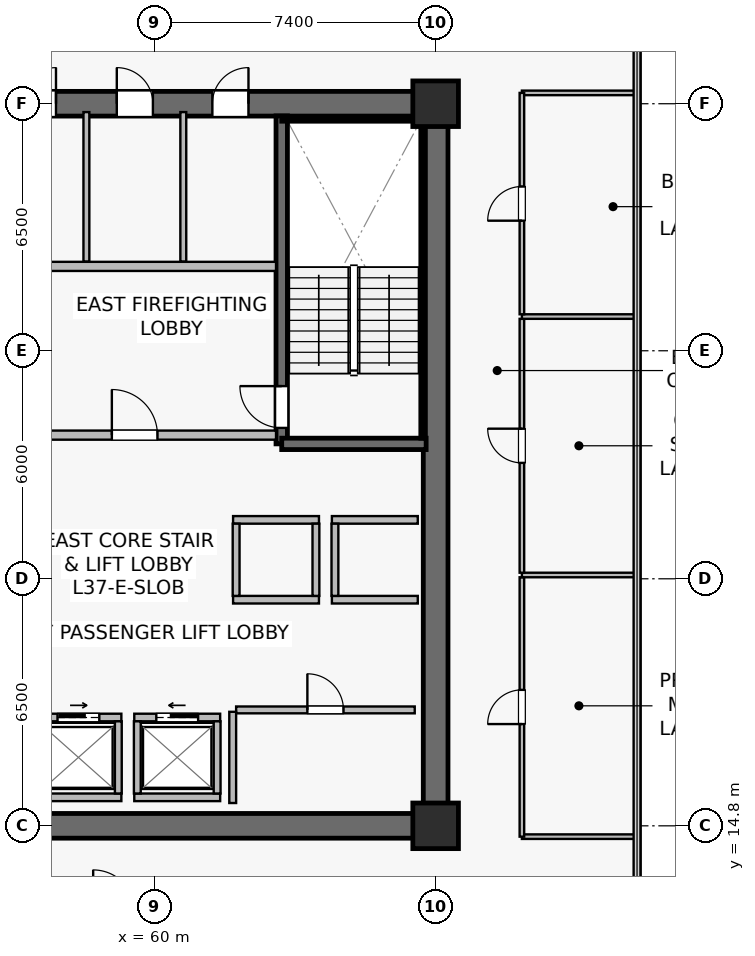
"""IFC4 building model, lengths in metres.
Left out: names, types, materials, properties, quantities, classifications, styles, units other than length and angle.
Written with IfcOpenShell. Run it as: python <this file> out.ifc"""

import sys

from ifc_helpers import new_model, si_unit, direction, frame, frame_2d, origin, origin_2d, place, context, subcontext, project, spatial, rectangle, extrude, source, transform, mapped, element, fill, save


model = new_model("IFC4")
c1 = context("Model", 3, precision=1e-05, world=origin(), true_north=direction((0.0, 1.0)))
c2 = subcontext(c1, "Body", "Model", "MODEL_VIEW")
j1 = project(units=[si_unit("LENGTHUNIT", "METRE"), si_unit("PLANEANGLEUNIT", "RADIAN")], contexts=[c1])
p1 = place(None, origin())
s1 = spatial("IfcSite", under=j1, at=p1, CompositionType="ELEMENT")
p2 = place(p1, origin())
s2 = spatial("IfcBuilding", under=s1, at=p2, CompositionType="ELEMENT")
p3 = place(p2, frame((0.0, 0.0, 154.3)))
s3 = spatial("IfcBuildingStorey", under=s2, at=p3, CompositionType="ELEMENT", Elevation=154.3)
p4 = place(p3, frame((52.275, 14.8, 0.0), z_axis=(0.0, 0.0, 1.0), x_axis=(1.0, 0.0, 0.0)))
e1 = element("IfcWall", 1, at=p4, inside=s3, PredefinedType="SHEAR", context=c2, shape_type="SweptSolid", body=[
    extrude(rectangle(XDim=15.45, YDim=0.65, at=frame_2d((7.725, 0.0))), origin(), (0.0, 0.0, 1.0), 3.79),
])
p5 = place(p3, frame((52.275, 33.8, 0.0), z_axis=(0.0, 0.0, 1.0), x_axis=(1.0, 0.0, 0.0)))
e2 = element("IfcWall", 2, at=p5, inside=s3, PredefinedType="SHEAR", context=c2, shape_type="SweptSolid", body=[
    extrude(rectangle(XDim=15.45, YDim=0.65, at=frame_2d((7.725, 0.0))), origin(), (0.0, 0.0, 1.0), 3.79),
])
p6 = place(p5, frame((9.25, 0.0, 0.0)))
e3 = element("IfcOpeningElement", 3, at=p6, cuts=e2, PredefinedType="OPENING", context=c2, shape_type="SweptSolid", body=[
    extrude(rectangle(XDim=0.95, YDim=2.15, at=frame_2d((0.475, 1.075))), frame((0.0, 0.335, 0.0), z_axis=(0.0, -1.0, 0.0), x_axis=(1.0, 0.0, 0.0)), (0.0, 0.0, 1.0), 0.67),
])
p7 = place(p5, frame((6.735, 0.0, 0.0)))
e4 = element("IfcOpeningElement", 4, at=p7, cuts=e2, PredefinedType="OPENING", context=c2, shape_type="SweptSolid", body=[
    extrude(rectangle(XDim=0.95, YDim=2.15, at=frame_2d((0.475, 1.075))), frame((0.0, 0.335, 0.0), z_axis=(0.0, -1.0, 0.0), x_axis=(1.0, 0.0, 0.0)), (0.0, 0.0, 1.0), 0.67),
])
p8 = place(p5, frame((4.185, 0.0, 0.0)))
e5 = element("IfcOpeningElement", 5, at=p8, cuts=e2, PredefinedType="OPENING", context=c2, shape_type="SweptSolid", body=[
    extrude(rectangle(XDim=0.95, YDim=2.15, at=frame_2d((0.475, 1.075))), frame((0.0, 0.335, 0.0), z_axis=(0.0, -1.0, 0.0), x_axis=(1.0, 0.0, 0.0)), (0.0, 0.0, 1.0), 0.67),
])
p9 = place(p5, frame((1.635, 0.0, 0.0)))
e6 = element("IfcOpeningElement", 6, at=p9, cuts=e2, PredefinedType="OPENING", context=c2, shape_type="SweptSolid", body=[
    extrude(rectangle(XDim=0.95, YDim=2.15, at=frame_2d((0.475, 1.075))), frame((0.0, 0.335, 0.0), z_axis=(0.0, -1.0, 0.0), x_axis=(1.0, 0.0, 0.0)), (0.0, 0.0, 1.0), 0.67),
])
p10 = place(p3, frame((67.4, 15.125, 0.0), z_axis=(0.0, 0.0, 1.0), x_axis=(0.0, 1.0, 0.0)))
e7 = element("IfcWall", 7, at=p10, inside=s3, PredefinedType="SHEAR", context=c2, shape_type="SweptSolid", body=[
    extrude(rectangle(XDim=18.35, YDim=0.65, at=frame_2d((9.175, 0.0))), origin(), (0.0, 0.0, 1.0), 3.79),
])
p11 = place(p3, frame((63.35, 24.85, 0.0), z_axis=(0.0, 0.0, 1.0), x_axis=(0.0, 1.0, 0.0)))
e8 = element("IfcWall", 8, at=p11, inside=s3, PredefinedType="SHEAR", context=c2, shape_type="SweptSolid", body=[
    extrude(rectangle(XDim=8.63, YDim=0.3, at=frame_2d((4.315, 0.0))), origin(), (0.0, 0.0, 1.0), 3.79),
])
p12 = place(p11, frame((0.42, 0.0, 0.0)))
e9 = element("IfcOpeningElement", 9, at=p12, cuts=e8, PredefinedType="OPENING", context=c2, shape_type="SweptSolid", body=[
    extrude(rectangle(XDim=1.1, YDim=2.15, at=frame_2d((0.55, 1.075))), frame((0.0, 0.16, 0.0), z_axis=(0.0, -1.0, 0.0), x_axis=(1.0, 0.0, 0.0)), (0.0, 0.0, 1.0), 0.32),
])
p13 = place(p3, frame((63.35, 24.85, 0.0), z_axis=(0.0, 0.0, 1.0), x_axis=(1.0, 0.0, 0.0)))
e10 = element("IfcWall", 10, at=p13, inside=s3, PredefinedType="SHEAR", context=c2, shape_type="SweptSolid", body=[
    extrude(rectangle(XDim=3.8, YDim=0.3, at=frame_2d((1.9, 0.0))), origin(), (0.0, 0.0, 1.0), 3.79),
])
p14 = place(p3, frame((63.35, 33.4, 0.0), z_axis=(0.0, 0.0, 1.0), x_axis=(1.0, 0.0, 0.0)))
e11 = element("IfcWall", 11, at=p14, inside=s3, PredefinedType="SOLIDWALL", context=c2, shape_type="SweptSolid", body=[
    extrude(rectangle(XDim=3.72, YDim=0.12, at=frame_2d((1.86, 0.0))), origin(), (0.0, 0.0, 1.0), 3.79),
])
p15 = place(p3, frame((67.07, 25.0, 0.0), z_axis=(0.0, 0.0, 1.0), x_axis=(0.0, 1.0, 0.0)))
e12 = element("IfcWall", 12, at=p15, inside=s3, PredefinedType="SOLIDWALL", context=c2, shape_type="SweptSolid", body=[
    extrude(rectangle(XDim=8.32, YDim=0.12, at=frame_2d((4.16, 0.0))), origin(), (0.0, 0.0, 1.0), 3.79),
])
m1 = source(origin(), c2, "Body", "SweptSolid", [
    extrude(rectangle(XDim=1.2, YDim=1.2, at=origin_2d()), origin(), (0.0, 0.0, 1.0), 4.1),
])
for number, where, z_axis, x_axis in (
    (13, (67.4, 14.8, 0.0), (0.0, 0.0, 1.0), (1.0, 0.0, 0.0)),
    (14, (67.4, 33.8, 0.0), (0.0, 0.0, 1.0), (1.0, 0.0, 0.0)),
):
    element("IfcColumn", number, at=place(p3, frame(where, z_axis=z_axis, x_axis=x_axis)), inside=s3, PredefinedType="COLUMN", context=c2, shape_type="MappedRepresentation", body=[
        mapped(m1, transform((0.0, 0.0, 0.0), scale=1.0)),
    ])
p16 = place(p3, frame((56.28, 25.08, 0.0), z_axis=(0.0, 0.0, 1.0), x_axis=(1.0, 0.0, 0.0)))
e15 = element("IfcWall", 15, at=p16, inside=s3, PredefinedType="SOLIDWALL", context=c2, shape_type="SweptSolid", body=[
    extrude(rectangle(XDim=6.92, YDim=0.24, at=frame_2d((3.46, 0.0))), origin(), (0.0, 0.0, 1.0), 3.187),
])
p17 = place(p16, frame((2.6, 0.0, 0.0)))
e16 = element("IfcOpeningElement", 16, at=p17, cuts=e15, PredefinedType="OPENING", context=c2, shape_type="SweptSolid", body=[
    extrude(rectangle(XDim=1.2, YDim=2.16, at=frame_2d((0.6, 1.08))), frame((0.0, 0.13, 0.0), z_axis=(0.0, -1.0, 0.0), x_axis=(1.0, 0.0, 0.0)), (0.0, 0.0, 1.0), 0.26),
])
p18 = place(p3, frame((56.28, 29.52, 0.0), z_axis=(0.0, 0.0, 1.0), x_axis=(1.0, 0.0, 0.0)))
e17 = element("IfcWall", 17, at=p18, inside=s3, PredefinedType="SOLIDWALL", context=c2, shape_type="SweptSolid", body=[
    extrude(rectangle(XDim=6.92, YDim=0.24, at=frame_2d((3.46, 0.0))), origin(), (0.0, 0.0, 1.0), 3.187),
])
p19 = place(p3, frame((59.47, 17.65, 0.0), z_axis=(0.0, 0.0, 1.0), x_axis=(1.0, 0.0, 0.0)))
e18 = element("IfcWall", 18, at=p19, inside=s3, PredefinedType="SOLIDWALL", context=c2, shape_type="SweptSolid", body=[
    extrude(rectangle(XDim=2.26, YDim=0.2, at=frame_2d((1.13, 0.0))), origin(), (0.0, 0.0, 1.0), 3.187),
])
p20 = place(p19, frame((0.58, 0.0, 0.0)))
e19 = element("IfcOpeningElement", 19, at=p20, cuts=e18, PredefinedType="OPENING", context=c2, shape_type="SweptSolid", body=[
    extrude(rectangle(XDim=1.1, YDim=2.22, at=frame_2d((0.55, 1.11))), frame((0.0, 0.11, 0.0), z_axis=(0.0, -1.0, 0.0), x_axis=(1.0, 0.0, 0.0)), (0.0, 0.0, 1.0), 0.22),
])
p21 = place(p3, frame((59.47, 15.55, 0.0), z_axis=(0.0, 0.0, 1.0), x_axis=(1.0, 0.0, 0.0)))
e20 = element("IfcWall", 20, at=p21, inside=s3, PredefinedType="SOLIDWALL", context=c2, shape_type="SweptSolid", body=[
    extrude(rectangle(XDim=2.26, YDim=0.2, at=frame_2d((1.13, 0.0))), origin(), (0.0, 0.0, 1.0), 3.187),
])
for number, where, z_axis, x_axis in (
    (21, (59.55, 15.65, 0.0), (0.0, 0.0, 1.0), (0.0, 1.0, 0.0)),
    (22, (61.65, 15.65, 0.0), (0.0, 0.0, 1.0), (0.0, 1.0, 0.0)),
):
    element("IfcWall", number, at=place(p3, frame(where, z_axis=z_axis, x_axis=x_axis)), inside=s3, PredefinedType="SOLIDWALL", context=c2, shape_type="SweptSolid", body=[
        extrude(rectangle(XDim=1.9, YDim=0.18, at=frame_2d((0.95, 0.0))), origin(), (0.0, 0.0, 1.0), 3.79),
    ])
p22 = place(p3, frame((56.87, 17.65, 0.0), z_axis=(0.0, 0.0, 1.0), x_axis=(1.0, 0.0, 0.0)))
e23 = element("IfcWall", 23, at=p22, inside=s3, PredefinedType="SOLIDWALL", context=c2, shape_type="SweptSolid", body=[
    extrude(rectangle(XDim=2.26, YDim=0.2, at=frame_2d((1.13, 0.0))), origin(), (0.0, 0.0, 1.0), 3.79),
])
p23 = place(p22, frame((0.58, 0.0, 0.0)))
e24 = element("IfcOpeningElement", 24, at=p23, cuts=e23, PredefinedType="OPENING", context=c2, shape_type="SweptSolid", body=[
    extrude(rectangle(XDim=1.1, YDim=2.22, at=frame_2d((0.55, 1.11))), frame((0.0, 0.11, 0.0), z_axis=(0.0, -1.0, 0.0), x_axis=(1.0, 0.0, 0.0)), (0.0, 0.0, 1.0), 0.22),
])
p24 = place(p3, frame((56.87, 15.55, 0.0), z_axis=(0.0, 0.0, 1.0), x_axis=(1.0, 0.0, 0.0)))
e25 = element("IfcWall", 25, at=p24, inside=s3, PredefinedType="SOLIDWALL", context=c2, shape_type="SweptSolid", body=[
    extrude(rectangle(XDim=2.26, YDim=0.2, at=frame_2d((1.13, 0.0))), origin(), (0.0, 0.0, 1.0), 3.79),
])
p25 = place(p3, frame((59.05, 15.65, 0.0), z_axis=(0.0, 0.0, 1.0), x_axis=(0.0, 1.0, 0.0)))
e26 = element("IfcWall", 26, at=p25, inside=s3, PredefinedType="SOLIDWALL", context=c2, shape_type="SweptSolid", body=[
    extrude(rectangle(XDim=1.9, YDim=0.18, at=frame_2d((0.95, 0.0))), origin(), (0.0, 0.0, 1.0), 3.79),
])
for number, where, z_axis, x_axis in (
    (27, (64.67, 20.75, 0.0), (0.0, 0.0, 1.0), (1.0, 0.0, 0.0)),
    (28, (64.67, 22.85, 0.0), (0.0, 0.0, 1.0), (1.0, 0.0, 0.0)),
):
    element("IfcWall", number, at=place(p3, frame(where, z_axis=z_axis, x_axis=x_axis)), inside=s3, PredefinedType="SOLIDWALL", context=c2, shape_type="SweptSolid", body=[
        extrude(rectangle(XDim=2.26, YDim=0.2, at=frame_2d((1.13, 0.0))), origin(), (0.0, 0.0, 1.0), 3.79),
    ])
p26 = place(p3, frame((64.75, 20.85, 0.0), z_axis=(0.0, 0.0, 1.0), x_axis=(0.0, 1.0, 0.0)))
e29 = element("IfcWall", 29, at=p26, inside=s3, PredefinedType="SOLIDWALL", context=c2, shape_type="SweptSolid", body=[
    extrude(rectangle(XDim=1.9, YDim=0.18, at=frame_2d((0.95, 0.0))), origin(), (0.0, 0.0, 1.0), 3.79),
])
for number, where, z_axis, x_axis in (
    (30, (62.07, 20.75, 0.0), (0.0, 0.0, 1.0), (1.0, 0.0, 0.0)),
    (31, (62.07, 22.85, 0.0), (0.0, 0.0, 1.0), (1.0, 0.0, 0.0)),
):
    element("IfcWall", number, at=place(p3, frame(where, z_axis=z_axis, x_axis=x_axis)), inside=s3, PredefinedType="SOLIDWALL", context=c2, shape_type="SweptSolid", body=[
        extrude(rectangle(XDim=2.26, YDim=0.2, at=frame_2d((1.13, 0.0))), origin(), (0.0, 0.0, 1.0), 3.79),
    ])
for number, where, z_axis, x_axis in (
    (32, (62.15, 20.85, 0.0), (0.0, 0.0, 1.0), (0.0, 1.0, 0.0)),
    (33, (64.25, 20.85, 0.0), (0.0, 0.0, 1.0), (0.0, 1.0, 0.0)),
):
    element("IfcWall", number, at=place(p3, frame(where, z_axis=z_axis, x_axis=x_axis)), inside=s3, PredefinedType="SOLIDWALL", context=c2, shape_type="SweptSolid", body=[
        extrude(rectangle(XDim=1.9, YDim=0.18, at=frame_2d((0.95, 0.0))), origin(), (0.0, 0.0, 1.0), 3.79),
    ])
p27 = place(p3, frame((62.15, 17.85, 0.0), z_axis=(0.0, 0.0, 1.0), x_axis=(1.0, 0.0, 0.0)))
e34 = element("IfcWall", 34, at=p27, inside=s3, PredefinedType="SOLIDWALL", context=c2, shape_type="SweptSolid", body=[
    extrude(rectangle(XDim=4.7, YDim=0.18, at=frame_2d((2.35, 0.0))), origin(), (0.0, 0.0, 1.0), 3.79),
])
p28 = place(p27, frame((1.875, 0.0, 0.0)))
e35 = element("IfcOpeningElement", 35, at=p28, cuts=e34, PredefinedType="OPENING", context=c2, shape_type="SweptSolid", body=[
    extrude(rectangle(XDim=0.95, YDim=2.15, at=frame_2d((0.475, 1.075))), frame((0.0, 0.1, 0.0), z_axis=(0.0, -1.0, 0.0), x_axis=(1.0, 0.0, 0.0)), (0.0, 0.0, 1.0), 0.2),
])
p29 = place(p3, frame((62.06, 15.4, 0.0), z_axis=(0.0, 0.0, 1.0), x_axis=(0.0, 1.0, 0.0)))
e36 = element("IfcWall", 36, at=p29, inside=s3, PredefinedType="SOLIDWALL", context=c2, shape_type="SweptSolid", body=[
    extrude(rectangle(XDim=2.4, YDim=0.18, at=frame_2d((1.2, 0.0))), origin(), (0.0, 0.0, 1.0), 3.79),
])
for number, where, z_axis, x_axis in (
    (37, (60.76, 29.65, 0.0), (0.0, 0.0, 1.0), (0.0, 1.0, 0.0)),
    (38, (58.21, 29.65, 0.0), (0.0, 0.0, 1.0), (0.0, 1.0, 0.0)),
):
    element("IfcWall", number, at=place(p3, frame(where, z_axis=z_axis, x_axis=x_axis)), inside=s3, PredefinedType="PLUMBINGWALL", context=c2, shape_type="SweptSolid", body=[
        extrude(rectangle(XDim=3.93, YDim=0.155, at=frame_2d((1.965, 0.0))), origin(), (0.0, 0.0, 1.0), 3.79),
    ])
for number, where, z_axis, x_axis in (
    (39, (69.67, 14.515, 0.0), (0.0, 0.0, 1.0), (1.0, 0.0, 0.0)),
    (40, (69.67, 34.085, 0.0), (0.0, 0.0, 1.0), (1.0, 0.0, 0.0)),
):
    element("IfcWall", number, at=place(p3, frame(where, z_axis=z_axis, x_axis=x_axis)), inside=s3, PredefinedType="PARTITIONING", context=c2, shape_type="SweptSolid", body=[
        extrude(rectangle(XDim=3.02, YDim=0.12, at=frame_2d((1.51, 0.0))), origin(), (0.0, 0.0, 1.0), 3.79),
    ])
p30 = place(p3, frame((69.67, 14.515, 0.0), z_axis=(0.0, 0.0, 1.0), x_axis=(0.0, 1.0, 0.0)))
e41 = element("IfcWall", 41, at=p30, inside=s3, PredefinedType="PARTITIONING", context=c2, shape_type="SweptSolid", body=[
    extrude(rectangle(XDim=6.825, YDim=0.12, at=frame_2d((3.413, 0.0))), origin(), (0.0, 0.0, 1.0), 3.79),
])
p31 = place(p30, frame((2.962, 0.0, 0.0)))
e42 = element("IfcOpeningElement", 42, at=p31, cuts=e41, PredefinedType="OPENING", context=c2, shape_type="SweptSolid", body=[
    extrude(rectangle(XDim=0.9, YDim=2.1, at=frame_2d((0.45, 1.05))), frame((0.0, 0.07, 0.0), z_axis=(0.0, -1.0, 0.0), x_axis=(1.0, 0.0, 0.0)), (0.0, 0.0, 1.0), 0.14),
])
p32 = place(p3, frame((69.67, 21.4, 0.0), z_axis=(0.0, 0.0, 1.0), x_axis=(1.0, 0.0, 0.0)))
e43 = element("IfcWall", 43, at=p32, inside=s3, PredefinedType="PARTITIONING", context=c2, shape_type="SweptSolid", body=[
    extrude(rectangle(XDim=3.02, YDim=0.12, at=frame_2d((1.51, 0.0))), origin(), (0.0, 0.0, 1.0), 3.79),
])
p33 = place(p3, frame((69.67, 21.46, 0.0), z_axis=(0.0, 0.0, 1.0), x_axis=(0.0, 1.0, 0.0)))
e44 = element("IfcWall", 44, at=p33, inside=s3, PredefinedType="PARTITIONING", context=c2, shape_type="SweptSolid", body=[
    extrude(rectangle(XDim=6.68, YDim=0.12, at=frame_2d((3.34, 0.0))), origin(), (0.0, 0.0, 1.0), 3.79),
])
p34 = place(p33, frame((2.89, 0.0, 0.0)))
e45 = element("IfcOpeningElement", 45, at=p34, cuts=e44, PredefinedType="OPENING", context=c2, shape_type="SweptSolid", body=[
    extrude(rectangle(XDim=0.9, YDim=2.1, at=frame_2d((0.45, 1.05))), frame((0.0, 0.07, 0.0), z_axis=(0.0, -1.0, 0.0), x_axis=(1.0, 0.0, 0.0)), (0.0, 0.0, 1.0), 0.14),
])
p35 = place(p3, frame((69.67, 28.2, 0.0), z_axis=(0.0, 0.0, 1.0), x_axis=(1.0, 0.0, 0.0)))
e46 = element("IfcWall", 46, at=p35, inside=s3, PredefinedType="PARTITIONING", context=c2, shape_type="SweptSolid", body=[
    extrude(rectangle(XDim=3.02, YDim=0.12, at=frame_2d((1.51, 0.0))), origin(), (0.0, 0.0, 1.0), 3.79),
])
p36 = place(p3, frame((69.67, 28.26, 0.0), z_axis=(0.0, 0.0, 1.0), x_axis=(0.0, 1.0, 0.0)))
e47 = element("IfcWall", 47, at=p36, inside=s3, PredefinedType="PARTITIONING", context=c2, shape_type="SweptSolid", body=[
    extrude(rectangle(XDim=5.825, YDim=0.12, at=frame_2d((2.913, 0.0))), origin(), (0.0, 0.0, 1.0), 3.79),
])
p37 = place(p36, frame((2.462, 0.0, 0.0)))
e48 = element("IfcOpeningElement", 48, at=p37, cuts=e47, PredefinedType="OPENING", context=c2, shape_type="SweptSolid", body=[
    extrude(rectangle(XDim=0.9, YDim=2.1, at=frame_2d((0.45, 1.05))), frame((0.0, 0.07, 0.0), z_axis=(0.0, -1.0, 0.0), x_axis=(1.0, 0.0, 0.0)), (0.0, 0.0, 1.0), 0.14),
])
m2 = source(origin(), c2, "Body", "SweptSolid", [
    extrude(rectangle(XDim=1.1, YDim=2.15, at=frame_2d((0.55, 1.075))), frame((0.0, 0.025, 0.0), z_axis=(0.0, -1.0, 0.0), x_axis=(1.0, 0.0, 0.0)), (0.0, 0.0, 1.0), 0.05),
])
p38 = place(p12, origin())
e49 = element("IfcDoor", 49, at=p38, inside=s3, OperationType="SINGLE_SWING_RIGHT", PredefinedType="DOOR", context=c2, shape_type="MappedRepresentation", body=[
    mapped(m2, transform((0.0, 0.0, 0.0), scale=1.0)),
])
fill(e9, e49)
m3 = source(origin(), c2, "Body", "SweptSolid", [
    extrude(rectangle(XDim=1.2, YDim=2.16, at=frame_2d((0.6, 1.08))), frame((0.0, 0.025, 0.0), z_axis=(0.0, -1.0, 0.0), x_axis=(1.0, 0.0, 0.0)), (0.0, 0.0, 1.0), 0.05),
])
p39 = place(p17, origin())
e50 = element("IfcDoor", 50, at=p39, inside=s3, OperationType="SINGLE_SWING_LEFT", PredefinedType="DOOR", context=c2, shape_type="MappedRepresentation", body=[
    mapped(m3, transform((0.0, 0.0, 0.0), scale=1.0)),
])
fill(e16, e50)
m4 = source(origin(), c2, "Body", "SweptSolid", [
    extrude(rectangle(XDim=1.1, YDim=2.22, at=frame_2d((0.55, 1.11))), frame((0.0, 0.025, 0.0), z_axis=(0.0, -1.0, 0.0), x_axis=(1.0, 0.0, 0.0)), (0.0, 0.0, 1.0), 0.05),
])
p40 = place(p20, origin())
e51 = element("IfcDoor", 51, at=p40, inside=s3, OperationType="SLIDING_TO_LEFT", PredefinedType="USERDEFINED", context=c2, shape_type="MappedRepresentation", body=[
    mapped(m4, transform((0.0, 0.0, 0.0), scale=1.0)),
])
fill(e19, e51)
p41 = place(p23, origin())
e52 = element("IfcDoor", 52, at=p41, inside=s3, OperationType="SLIDING_TO_RIGHT", PredefinedType="USERDEFINED", context=c2, shape_type="MappedRepresentation", body=[
    mapped(m4, transform((0.0, 0.0, 0.0), scale=1.0)),
])
fill(e24, e52)
m5 = source(origin(), c2, "Body", "SweptSolid", [
    extrude(rectangle(XDim=0.95, YDim=2.15, at=frame_2d((0.475, 1.075))), frame((0.0, 0.025, 0.0), z_axis=(0.0, -1.0, 0.0), x_axis=(1.0, 0.0, 0.0)), (0.0, 0.0, 1.0), 0.05),
])
p42 = place(p28, origin())
e53 = element("IfcDoor", 53, at=p42, inside=s3, OperationType="SINGLE_SWING_LEFT", PredefinedType="DOOR", context=c2, shape_type="MappedRepresentation", body=[
    mapped(m5, transform((0.0, 0.0, 0.0), scale=1.0)),
])
fill(e35, e53)
p43 = place(p6, origin())
e54 = element("IfcDoor", 54, at=p43, inside=s3, OperationType="SINGLE_SWING_RIGHT", PredefinedType="DOOR", context=c2, shape_type="MappedRepresentation", body=[
    mapped(m5, transform((0.0, 0.0, 0.0), scale=1.0)),
])
fill(e3, e54)
p44 = place(p7, origin())
e55 = element("IfcDoor", 55, at=p44, inside=s3, OperationType="SINGLE_SWING_LEFT", PredefinedType="DOOR", context=c2, shape_type="MappedRepresentation", body=[
    mapped(m5, transform((0.0, 0.0, 0.0), scale=1.0)),
])
fill(e4, e55)
p45 = place(p8, origin())
e56 = element("IfcDoor", 56, at=p45, inside=s3, OperationType="SINGLE_SWING_RIGHT", PredefinedType="DOOR", context=c2, shape_type="MappedRepresentation", body=[
    mapped(m5, transform((0.0, 0.0, 0.0), scale=1.0)),
])
fill(e5, e56)
m6 = source(origin(), c2, "Body", "SweptSolid", [
    extrude(rectangle(XDim=0.9, YDim=2.1, at=frame_2d((0.45, 1.05))), frame((0.0, 0.025, 0.0), z_axis=(0.0, -1.0, 0.0), x_axis=(1.0, 0.0, 0.0)), (0.0, 0.0, 1.0), 0.05),
])
p46 = place(p31, origin())
e57 = element("IfcDoor", 57, at=p46, inside=s3, OperationType="SINGLE_SWING_LEFT", PredefinedType="DOOR", context=c2, shape_type="MappedRepresentation", body=[
    mapped(m6, transform((0.0, 0.0, 0.0), scale=1.0)),
])
fill(e42, e57)
p47 = place(p34, origin())
e58 = element("IfcDoor", 58, at=p47, inside=s3, OperationType="SINGLE_SWING_RIGHT", PredefinedType="DOOR", context=c2, shape_type="MappedRepresentation", body=[
    mapped(m6, transform((0.0, 0.0, 0.0), scale=1.0)),
])
fill(e45, e58)
p48 = place(p37, origin())
e59 = element("IfcDoor", 59, at=p48, inside=s3, OperationType="SINGLE_SWING_LEFT", PredefinedType="DOOR", context=c2, shape_type="MappedRepresentation", body=[
    mapped(m6, transform((0.0, 0.0, 0.0), scale=1.0)),
])
fill(e48, e59)
save(model, sys.argv[1])
